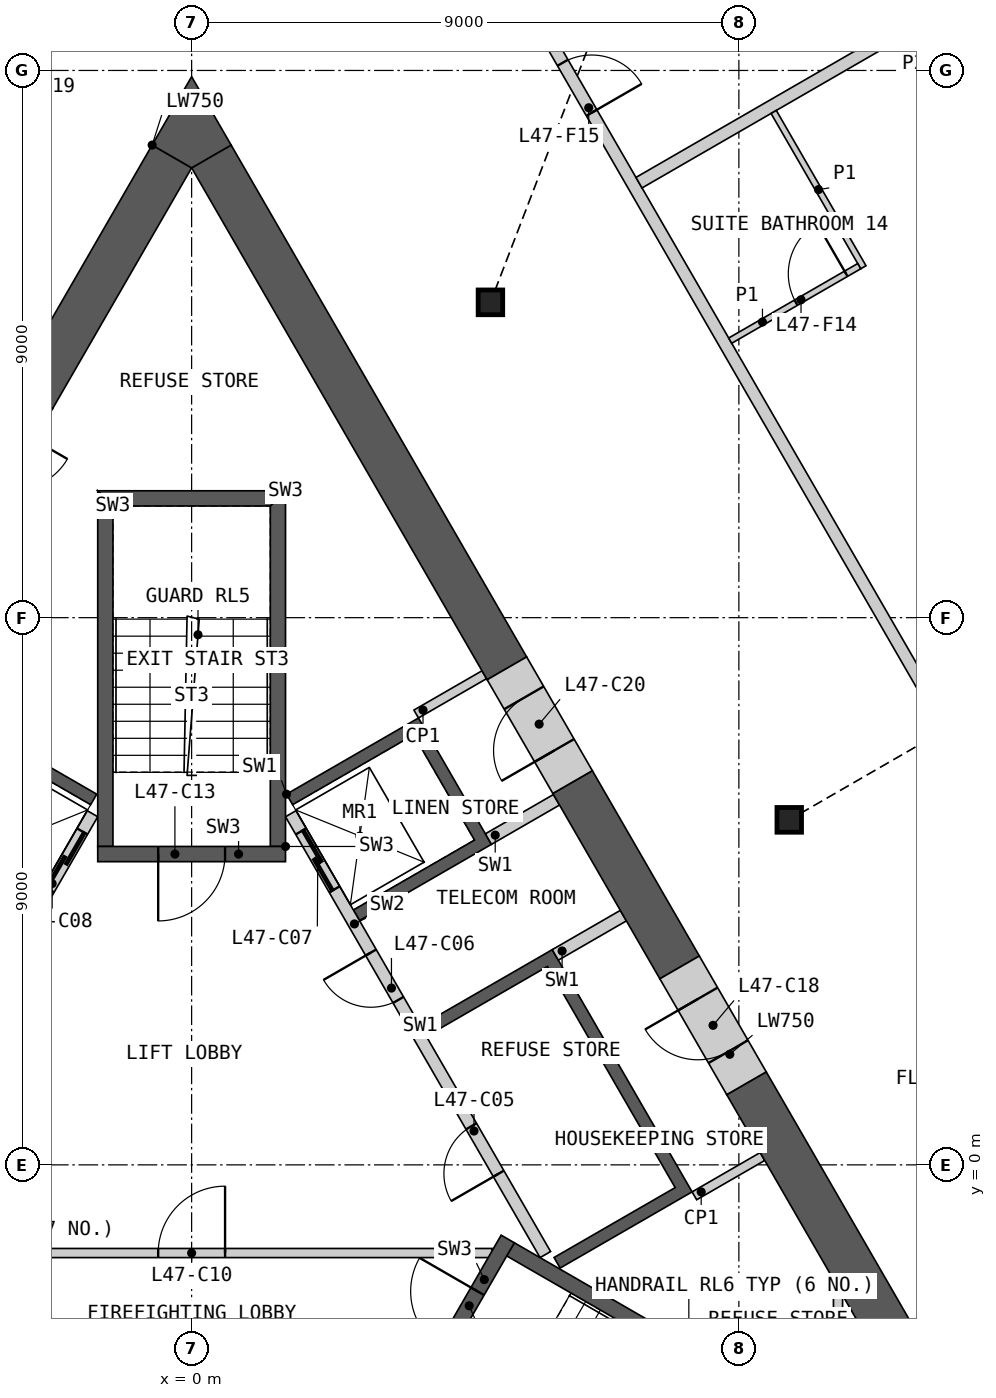
"""IFC4 building model, lengths in metres.
Left out: names, types, materials, properties, quantities, classifications, styles, units other than length and angle.
Written with IfcOpenShell. Run it as: python <this file> out.ifc"""

import sys

from ifc_helpers import new_model, si_unit, direction, frame, frame_2d, origin, origin_2d, place, context, subcontext, project, spatial, polyline, rectangle, i_section, outline, extrude, element, fill, save


model = new_model("IFC4")
c1 = context("Model", 3, precision=1e-05, world=origin(), true_north=direction((0.0, 1.0)))
c2 = subcontext(c1, "Body", "Model", "MODEL_VIEW")
j1 = project(units=[si_unit("LENGTHUNIT", "METRE"), si_unit("PLANEANGLEUNIT", "RADIAN")], contexts=[c1])
p1 = place(None, origin())
s1 = spatial("IfcSite", under=j1, at=p1, CompositionType="ELEMENT")
p2 = place(p1, origin())
s2 = spatial("IfcBuilding", under=s1, at=p2, CompositionType="ELEMENT")
p3 = place(p2, frame((0.0, 0.0, 212.4)))
s3 = spatial("IfcBuildingStorey", under=s2, at=p3, CompositionType="ELEMENT", Elevation=212.4)
for number, where, z_axis, x_axis in (
    (1, (9.828, 5.675, 0.0), (0.0, 0.0, 1.0), (1.0, 0.0, 0.0)),
    (2, (4.914, 14.186, 0.0), (0.0, 0.0, 1.0), (1.0, 0.0, 0.0)),
):
    element("IfcColumn", number, at=place(p3, frame(where, z_axis=z_axis, x_axis=x_axis)), inside=s3, PredefinedType="COLUMN", context=c2, shape_type="SweptSolid", body=[
        extrude(i_section(OverallWidth=0.404, OverallDepth=0.407, WebThickness=0.027, FlangeThickness=0.044, at=origin_2d()), origin(), (0.0, 0.0, 1.0), 3.6),
    ])
p4 = place(p3, origin())
e3 = element("IfcWall", 3, at=p4, inside=s3, PredefinedType="SHEAR", context=c2, shape_type="SweptSolid", body=[
    extrude(outline(polyline([(1.561, 6.097), (3.731, 7.35), (4.931, 5.272), (2.76, 4.019), (2.66, 4.192), (4.652, 5.342), (3.652, 7.074), (1.66, 5.924), (1.561, 6.097)])), origin(), (0.0, 0.0, 1.0), 3.25),
])
p5 = place(p3, origin())
e4 = element("IfcWall", 4, at=p5, inside=s3, PredefinedType="SHEAR", context=c2, shape_type="SweptSolid", body=[
    extrude(outline(polyline([(3.76, 2.287), (5.931, 3.54), (8.231, -0.444), (6.061, -1.697), (5.96, -1.524), (7.952, -0.374), (5.852, 3.263), (3.861, 2.113), (3.76, 2.287)])), origin(), (0.0, 0.0, 1.0), 3.25),
])
p6 = place(p3, frame((5.817, -1.476, 0.0), z_axis=(0.0, 0.0, 1.0), x_axis=(-0.500002616675, 0.866023893041, 0.0)))
e5 = element("IfcWall", 5, at=p6, inside=s3, PredefinedType="SOLIDWALL", context=c2, shape_type="SweptSolid", body=[
    extrude(rectangle(XDim=8.373, YDim=0.2, at=frame_2d((4.187, 0.0))), origin(), (0.0, 0.0, 1.0), 3.25),
])
p7 = place(p6, frame((1.537, 0.0, 0.0)))
e6 = element("IfcOpeningElement", 6, at=p7, cuts=e5, PredefinedType="OPENING", context=c2, shape_type="SweptSolid", body=[
    extrude(rectangle(XDim=0.9, YDim=2.1, at=frame_2d((0.45, 1.05))), frame((0.0, 0.11, 0.0), z_axis=(0.0, -1.0, 0.0), x_axis=(1.0, 0.0, 0.0)), (0.0, 0.0, 1.0), 0.22),
])
p8 = place(p6, frame((4.837, 0.0, 0.0)))
e7 = element("IfcOpeningElement", 7, at=p8, cuts=e5, PredefinedType="OPENING", context=c2, shape_type="SweptSolid", body=[
    extrude(rectangle(XDim=0.9, YDim=2.1, at=frame_2d((0.45, 1.05))), frame((0.0, 0.11, 0.0), z_axis=(0.0, -1.0, 0.0), x_axis=(1.0, 0.0, 0.0)), (0.0, 0.0, 1.0), 0.22),
])
p9 = place(p6, frame((6.937, 0.0, 0.0)))
e8 = element("IfcOpeningElement", 8, at=p9, cuts=e5, PredefinedType="OPENING", context=c2, shape_type="SweptSolid", body=[
    extrude(rectangle(XDim=1.1, YDim=2.1, at=frame_2d((0.55, 1.05))), frame((0.0, 0.11, 0.0), z_axis=(0.0, -1.0, 0.0), x_axis=(1.0, 0.0, 0.0)), (0.0, 0.0, 1.0), 0.22),
])
p10 = place(p3, frame((5.981, 3.453, 0.0), z_axis=(0.0, 0.0, 1.0), x_axis=(0.865968639725, 0.500098305348, 0.0)))
e9 = element("IfcWall", 9, at=p10, inside=s3, PredefinedType="SHEAR", context=c2, shape_type="SweptSolid", body=[
    extrude(rectangle(XDim=1.293, YDim=0.2, at=frame_2d((0.646, 0.0))), origin(), (0.0, 0.0, 1.0), 3.25),
])
p11 = place(p3, frame((4.881, 5.358, 0.0), z_axis=(0.0, 0.0, 1.0), x_axis=(0.866084958089, 0.499896834728, 0.0)))
e10 = element("IfcWall", 10, at=p11, inside=s3, PredefinedType="SHEAR", context=c2, shape_type="SweptSolid", body=[
    extrude(rectangle(XDim=1.293, YDim=0.2, at=frame_2d((0.646, 0.0))), origin(), (0.0, 0.0, 1.0), 3.25),
])
p12 = place(p3, origin())
e11 = element("IfcWall", 11, at=p12, inside=s3, PredefinedType="SHEAR", context=c2, shape_type="SweptSolid", body=[
    extrude(outline(polyline([(-4.96, 0.208), (-7.131, 1.461), (-3.731, 7.35), (-1.561, 6.097), (-1.66, 5.924), (-3.652, 7.074), (-4.652, 5.342), (-2.66, 4.192), (-2.76, 4.019), (-4.752, 5.169), (-5.752, 3.437), (-3.76, 2.287), (-3.861, 2.113), (-5.852, 3.263), (-6.852, 1.531), (-4.861, 0.381), (-4.96, 0.208)])), origin(), (0.0, 0.0, 1.0), 3.25),
])
p13 = place(p3, frame((-1.631, 5.776, 0.0), z_axis=(0.0, 0.0, 1.0), x_axis=(-0.499992876559, -0.866029516466, 0.0)))
e12 = element("IfcWall", 12, at=p13, inside=s3, PredefinedType="SOLIDWALL", context=c2, shape_type="SweptSolid", body=[
    extrude(rectangle(XDim=6.486, YDim=0.2, at=frame_2d((3.243, 0.0))), origin(), (0.0, 0.0, 1.0), 3.25),
])
p14 = place(p13, frame((0.337, 0.0, 0.0)))
e13 = element("IfcOpeningElement", 13, at=p14, cuts=e12, PredefinedType="OPENING", context=c2, shape_type="SweptSolid", body=[
    extrude(rectangle(XDim=1.1, YDim=2.1, at=frame_2d((0.55, 1.05))), frame((0.0, 0.11, 0.0), z_axis=(0.0, -1.0, 0.0), x_axis=(1.0, 0.0, 0.0)), (0.0, 0.0, 1.0), 0.22),
])
p15 = place(p13, frame((2.537, 0.0, 0.0)))
e14 = element("IfcOpeningElement", 14, at=p15, cuts=e12, PredefinedType="OPENING", context=c2, shape_type="SweptSolid", body=[
    extrude(rectangle(XDim=1.1, YDim=2.1, at=frame_2d((0.55, 1.05))), frame((0.0, 0.11, 0.0), z_axis=(0.0, -1.0, 0.0), x_axis=(1.0, 0.0, 0.0)), (0.0, 0.0, 1.0), 0.22),
])
p16 = place(p3, frame((-4.941, -1.45, 0.0), z_axis=(0.0, 0.0, 1.0), x_axis=(1.0, 0.0, 0.0)))
e15 = element("IfcWall", 15, at=p16, inside=s3, PredefinedType="PARTITIONING", context=c2, shape_type="SweptSolid", body=[
    extrude(rectangle(XDim=9.882, YDim=0.15, at=frame_2d((4.941, 0.0))), origin(), (0.0, 0.0, 1.0), 3.25),
])
p17 = place(p16, frame((4.391, 0.0, 0.0)))
e16 = element("IfcOpeningElement", 16, at=p17, cuts=e15, PredefinedType="OPENING", context=c2, shape_type="SweptSolid", body=[
    extrude(rectangle(XDim=1.1, YDim=2.1, at=frame_2d((0.55, 1.05))), frame((0.0, 0.085, 0.0), z_axis=(0.0, -1.0, 0.0), x_axis=(1.0, 0.0, 0.0)), (0.0, 0.0, 1.0), 0.17),
])
p18 = place(p3, origin())
e17 = element("IfcWall", 17, at=p18, inside=s3, PredefinedType="SHEAR", context=c2, shape_type="SweptSolid", body=[
    extrude(outline(polyline([(10.032, -4.298), (10.374, -4.206), (5.307, -1.281), (5.182, -1.498), (10.032, -4.298)])), origin(), (0.0, 0.0, 1.0), 3.25),
])
p19 = place(p3, frame((3.655, -3.893, 0.0), z_axis=(0.0, 0.0, 1.0), x_axis=(0.499982516597, 0.866035497597, 0.0)))
e18 = element("IfcWall", 18, at=p19, inside=s3, PredefinedType="SHEAR", context=c2, shape_type="SweptSolid", body=[
    extrude(rectangle(XDim=3.088, YDim=0.25, at=frame_2d((1.544, 0.0))), origin(), (0.0, 0.0, 1.0), 3.25),
])
p20 = place(p19, frame((0.994, 0.0, 0.0)))
e19 = element("IfcOpeningElement", 19, at=p20, cuts=e18, PredefinedType="OPENING", context=c2, shape_type="SweptSolid", body=[
    extrude(rectangle(XDim=1.1, YDim=2.1, at=frame_2d((0.55, 1.05))), frame((0.0, 0.135, 0.0), z_axis=(0.0, -1.0, 0.0), x_axis=(1.0, 0.0, 0.0)), (0.0, 0.0, 1.0), 0.27),
])
p21 = place(p3, origin())
e20 = element("IfcWall", 20, at=p21, inside=s3, PredefinedType="SHEAR", context=c2, shape_type="SweptSolid", body=[
    extrude(outline(polyline([(1.544, 5.237), (1.544, 11.087), (1.294, 10.837), (1.294, 5.237), (1.544, 5.237)])), origin(), (0.0, 0.0, 1.0), 3.25),
])
p22 = place(p3, origin())
e21 = element("IfcWall", 21, at=p22, inside=s3, PredefinedType="SHEAR", context=c2, shape_type="SweptSolid", body=[
    extrude(outline(polyline([(1.544, 11.087), (-1.544, 11.087), (-1.294, 10.837), (1.294, 10.837), (1.544, 11.087)])), origin(), (0.0, 0.0, 1.0), 3.25),
])
p23 = place(p3, origin())
e22 = element("IfcWall", 22, at=p23, inside=s3, PredefinedType="SHEAR", context=c2, shape_type="SweptSolid", body=[
    extrude(outline(polyline([(-1.294, 10.837), (-1.544, 11.087), (-1.544, 5.237), (-1.294, 5.237), (-1.294, 10.837)])), origin(), (0.0, 0.0, 1.0), 3.25),
])
p24 = place(p3, frame((1.544, 5.112, 0.0), z_axis=(0.0, 0.0, 1.0), x_axis=(-1.0, 0.0, 0.0)))
e23 = element("IfcWall", 23, at=p24, inside=s3, PredefinedType="SHEAR", context=c2, shape_type="SweptSolid", body=[
    extrude(rectangle(XDim=3.088, YDim=0.25, at=frame_2d((1.544, 0.0))), origin(), (0.0, 0.0, 1.0), 3.25),
])
p25 = place(p24, frame((0.994, 0.0, 0.0)))
e24 = element("IfcOpeningElement", 24, at=p25, cuts=e23, PredefinedType="OPENING", context=c2, shape_type="SweptSolid", body=[
    extrude(rectangle(XDim=1.1, YDim=2.1, at=frame_2d((0.55, 1.05))), frame((0.0, 0.135, 0.0), z_axis=(0.0, -1.0, 0.0), x_axis=(1.0, 0.0, 0.0)), (0.0, 0.0, 1.0), 0.27),
])
for number, where, z_axis, x_axis in (
    (25, (3.693, 7.415, 0.0), (0.0, 0.0, 1.0), (0.866, 0.5, 0.0)),
    (26, (8.268, -0.509, 0.0), (0.0, 0.0, 1.0), (0.866, 0.5, 0.0)),
):
    element("IfcWall", number, at=place(p3, frame(where, z_axis=z_axis, x_axis=x_axis)), inside=s3, PredefinedType="PARTITIONING", context=c2, shape_type="SweptSolid", body=[
        extrude(rectangle(XDim=1.293, YDim=0.15, at=frame_2d((0.646, 0.0))), origin(), (0.0, 0.0, 1.0), 3.25),
    ])
p26 = place(p3, frame((10.631, -8.199, 0.0), z_axis=(0.0, 0.0, 1.0), x_axis=(0.0, 1.0, 0.0)))
e27 = element("IfcWall", 27, at=p26, inside=s3, PredefinedType="PARTITIONING", context=c2, shape_type="SweptSolid", body=[
    extrude(rectangle(XDim=6.184, YDim=0.15, at=frame_2d((3.092, 0.0))), origin(), (0.0, 0.0, 1.0), 3.25),
])
p27 = place(p3, frame((5.185, 8.167, 0.0), z_axis=(0.0, 0.0, 1.0), x_axis=(-0.500004344816, 0.866022895289, 0.0)))
e28 = element("IfcWall", 28, at=p27, inside=s3, PredefinedType="SHEAR", context=c2, shape_type="SweptSolid", body=[
    extrude(rectangle(XDim=9.721, YDim=0.75, at=frame_2d((4.861, 0.0))), origin(), (0.0, 0.0, 1.0), 3.25),
])
p28 = place(p3, frame((12.228, -4.032, 0.0), z_axis=(0.0, 0.0, 1.0), x_axis=(-0.499993760127, 0.866029006347, 0.0)))
e29 = element("IfcWall", 29, at=p28, inside=s3, PredefinedType="SHEAR", context=c2, shape_type="SweptSolid", body=[
    extrude(rectangle(XDim=6.206, YDim=0.75, at=frame_2d((3.103, 0.0))), origin(), (0.0, 0.0, 1.0), 3.25),
])
p29 = place(p3, frame((8.025, 3.248, 0.0), z_axis=(0.0, 0.0, 1.0), x_axis=(-0.499958618571, 0.866049294045, 0.0)))
e30 = element("IfcWall", 30, at=p29, inside=s3, PredefinedType="SHEAR", context=c2, shape_type="SweptSolid", body=[
    extrude(rectangle(XDim=3.52, YDim=0.75, at=frame_2d((1.76, 0.0))), origin(), (0.0, 0.0, 1.0), 3.25),
])
p30 = place(p3, frame((-0.325, 16.585, 0.0), z_axis=(0.0, 0.0, 1.0), x_axis=(-0.499984617099, -0.866034284924, 0.0)))
e31 = element("IfcWall", 31, at=p30, inside=s3, PredefinedType="SHEAR", context=c2, shape_type="SweptSolid", body=[
    extrude(rectangle(XDim=4.568, YDim=0.75, at=frame_2d((2.284, 0.0))), origin(), (0.0, 0.0, 1.0), 3.25),
])
p31 = place(p3, origin())
e32 = element("IfcWall", 32, at=p31, inside=s3, PredefinedType="SHEAR", context=c2, shape_type="SweptSolid", body=[
    extrude(outline(polyline([(-0.649, 16.773), (0.0, 17.898), (0.649, 16.773), (0.0, 16.398), (-0.649, 16.773)])), origin(), (0.0, 0.0, 1.0), 3.25),
])
p32 = place(p3, frame((9.125, 1.343, 0.0), z_axis=(0.0, 0.0, 1.0), x_axis=(-0.499946605688, 0.86605622881, 0.0)))
e33 = element("IfcWall", 33, at=p32, inside=s3, PredefinedType="SHEAR", context=c2, shape_type="SweptSolid", body=[
    extrude(rectangle(XDim=2.2, YDim=0.75, at=frame_2d((1.1, 0.0))), origin(), (0.0, 0.0, 1.0), 3.25),
])
p33 = place(p32, frame((0.6, 0.0, 0.0)))
e34 = element("IfcOpeningElement", 34, at=p33, cuts=e33, PredefinedType="OPENING", context=c2, shape_type="SweptSolid", body=[
    extrude(rectangle(XDim=1.0, YDim=2.1, at=frame_2d((0.5, 1.05))), frame((0.0, 0.385, 0.0), z_axis=(0.0, -1.0, 0.0), x_axis=(1.0, 0.0, 0.0)), (0.0, 0.0, 1.0), 0.77),
])
p34 = place(p3, frame((6.265, 6.296, 0.0), z_axis=(0.0, 0.0, 1.0), x_axis=(-0.500029011134, 0.866008653551, 0.0)))
e35 = element("IfcWall", 35, at=p34, inside=s3, PredefinedType="SHEAR", context=c2, shape_type="SweptSolid", body=[
    extrude(rectangle(XDim=2.16, YDim=0.75, at=frame_2d((1.08, 0.0))), origin(), (0.0, 0.0, 1.0), 3.25),
])
p35 = place(p34, frame((0.6, 0.0, 0.0)))
e36 = element("IfcOpeningElement", 36, at=p35, cuts=e35, PredefinedType="OPENING", context=c2, shape_type="SweptSolid", body=[
    extrude(rectangle(XDim=1.0, YDim=2.1, at=frame_2d((0.5, 1.05))), frame((0.0, 0.385, 0.0), z_axis=(0.0, -1.0, 0.0), x_axis=(1.0, 0.0, 0.0)), (0.0, 0.0, 1.0), 0.77),
])
p36 = place(p3, frame((-2.609, 12.629, 0.0), z_axis=(0.0, 0.0, 1.0), x_axis=(-0.500077893725, -0.86598042715, 0.0)))
e37 = element("IfcWall", 37, at=p36, inside=s3, PredefinedType="SHEAR", context=c2, shape_type="SweptSolid", body=[
    extrude(rectangle(XDim=2.2, YDim=0.75, at=frame_2d((1.1, 0.0))), origin(), (0.0, 0.0, 1.0), 3.25),
])
p37 = place(p36, frame((0.6, 0.0, 0.0)))
e38 = element("IfcOpeningElement", 38, at=p37, cuts=e37, PredefinedType="OPENING", context=c2, shape_type="SweptSolid", body=[
    extrude(rectangle(XDim=1.0, YDim=2.1, at=frame_2d((0.5, 1.05))), frame((0.0, 0.385, 0.0), z_axis=(0.0, -1.0, 0.0), x_axis=(1.0, 0.0, 0.0)), (0.0, 0.0, 1.0), 0.77),
])
p38 = place(p3, frame((5.377, 19.385, 0.0), z_axis=(0.0, 0.0, 1.0), x_axis=(0.500000757641, -0.86602496636, 0.0)))
e39 = element("IfcWall", 39, at=p38, inside=s3, PredefinedType="PARTITIONING", context=c2, shape_type="SweptSolid", body=[
    extrude(rectangle(XDim=28.198, YDim=0.2, at=frame_2d((14.099, 0.0))), origin(), (0.0, 0.0, 1.0), 3.25),
])
p39 = place(p38, frame((25.345, 0.0, 0.0)))
e40 = element("IfcOpeningElement", 40, at=p39, cuts=e39, PredefinedType="OPENING", context=c2, shape_type="SweptSolid", body=[
    extrude(rectangle(XDim=1.8, YDim=2.1, at=frame_2d((0.9, 1.05))), frame((0.0, 0.11, 0.0), z_axis=(0.0, -1.0, 0.0), x_axis=(1.0, 0.0, 0.0)), (0.0, 0.0, 1.0), 0.22),
])
p40 = place(p38, frame((19.621, 0.0, 0.0)))
e41 = element("IfcOpeningElement", 41, at=p40, cuts=e39, PredefinedType="OPENING", context=c2, shape_type="SweptSolid", body=[
    extrude(rectangle(XDim=1.0, YDim=2.1, at=frame_2d((0.5, 1.05))), frame((0.0, 0.11, 0.0), z_axis=(0.0, -1.0, 0.0), x_axis=(1.0, 0.0, 0.0)), (0.0, 0.0, 1.0), 0.22),
])
p41 = place(p38, frame((16.409, 0.0, 0.0)))
e42 = element("IfcOpeningElement", 42, at=p41, cuts=e39, PredefinedType="OPENING", context=c2, shape_type="SweptSolid", body=[
    extrude(rectangle(XDim=1.1, YDim=2.1, at=frame_2d((0.55, 1.05))), frame((0.0, 0.11, 0.0), z_axis=(0.0, -1.0, 0.0), x_axis=(1.0, 0.0, 0.0)), (0.0, 0.0, 1.0), 0.22),
])
p42 = place(p38, frame((1.452, 0.0, 0.0)))
e43 = element("IfcOpeningElement", 43, at=p42, cuts=e39, PredefinedType="OPENING", context=c2, shape_type="SweptSolid", body=[
    extrude(rectangle(XDim=0.95, YDim=2.1, at=frame_2d((0.475, 1.05))), frame((0.0, 0.11, 0.0), z_axis=(0.0, -1.0, 0.0), x_axis=(1.0, 0.0, 0.0)), (0.0, 0.0, 1.0), 0.22),
])
p43 = place(p3, frame((-4.791, 14.4, 0.0), z_axis=(0.0, 0.0, 1.0), x_axis=(0.50000762079, 0.866021003874, 0.0)))
e44 = element("IfcWall", 44, at=p43, inside=s3, PredefinedType="PARTITIONING", context=c2, shape_type="SweptSolid", body=[
    extrude(rectangle(XDim=5.756, YDim=0.2, at=frame_2d((2.878, 0.0))), origin(), (0.0, 0.0, 1.0), 3.25),
])
p44 = place(p43, frame((4.304, 0.0, 0.0)))
e45 = element("IfcOpeningElement", 45, at=p44, cuts=e44, PredefinedType="OPENING", context=c2, shape_type="SweptSolid", body=[
    extrude(rectangle(XDim=1.1, YDim=2.1, at=frame_2d((0.55, 1.05))), frame((0.0, 0.11, 0.0), z_axis=(0.0, -1.0, 0.0), x_axis=(1.0, 0.0, 0.0)), (0.0, 0.0, 1.0), 0.22),
])
p45 = place(p3, frame((7.357, 16.154, 0.0), z_axis=(0.0, 0.0, 1.0), x_axis=(0.866029004385, 0.499993763526, 0.0)))
e46 = element("IfcWall", 46, at=p45, inside=s3, PredefinedType="PARTITIONING", context=c2, shape_type="SweptSolid", body=[
    extrude(rectangle(XDim=9.789, YDim=0.2, at=frame_2d((4.895, 0.0))), origin(), (0.0, 0.0, 1.0), 2.404),
])
p46 = place(p3, frame((9.573, 17.318, 0.0), z_axis=(0.0, 0.0, 1.0), x_axis=(0.500037662692, -0.866003658127, 0.0)))
e47 = element("IfcWall", 47, at=p46, inside=s3, PredefinedType="PARTITIONING", context=c2, shape_type="SweptSolid", body=[
    extrude(rectangle(XDim=2.95, YDim=0.1, at=frame_2d((1.475, 0.0))), origin(), (0.0, 0.0, 1.0), 2.404),
])
p47 = place(p3, frame((8.857, 13.556, 0.0), z_axis=(0.0, 0.0, 1.0), x_axis=(0.866014668023, 0.500018594424, 0.0)))
e48 = element("IfcWall", 48, at=p47, inside=s3, PredefinedType="PARTITIONING", context=c2, shape_type="SweptSolid", body=[
    extrude(rectangle(XDim=2.45, YDim=0.1, at=frame_2d((1.225, 0.0))), origin(), (0.0, 0.0, 1.0), 2.404),
])
p48 = place(p47, frame((1.25, 0.0, 0.0)))
e49 = element("IfcOpeningElement", 49, at=p48, cuts=e48, PredefinedType="OPENING", context=c2, shape_type="SweptSolid", body=[
    extrude(rectangle(XDim=0.95, YDim=2.1, at=frame_2d((0.475, 1.05))), frame((0.0, 0.06, 0.0), z_axis=(0.0, -1.0, 0.0), x_axis=(1.0, 0.0, 0.0)), (0.0, 0.0, 1.0), 0.12),
])
p49 = place(p7, origin())
e50 = element("IfcDoor", 50, at=p49, inside=s3, OperationType="SINGLE_SWING_LEFT", PredefinedType="DOOR", context=c2, shape_type="SweptSolid", body=[
    extrude(rectangle(XDim=0.9, YDim=2.1, at=frame_2d((0.45, 1.05))), frame((0.0, 0.025, 0.0), z_axis=(0.0, -1.0, 0.0), x_axis=(1.0, 0.0, 0.0)), (0.0, 0.0, 1.0), 0.05),
])
fill(e6, e50)
p50 = place(p8, origin())
e51 = element("IfcDoor", 51, at=p50, inside=s3, OperationType="SINGLE_SWING_RIGHT", PredefinedType="DOOR", context=c2, shape_type="SweptSolid", body=[
    extrude(rectangle(XDim=0.9, YDim=2.1, at=frame_2d((0.45, 1.05))), frame((0.0, 0.025, 0.0), z_axis=(0.0, -1.0, 0.0), x_axis=(1.0, 0.0, 0.0)), (0.0, 0.0, 1.0), 0.05),
])
fill(e7, e51)
p51 = place(p9, origin())
e52 = element("IfcDoor", 52, at=p51, inside=s3, OperationType="SLIDING_TO_LEFT", PredefinedType="DOOR", context=c2, shape_type="SweptSolid", body=[
    extrude(rectangle(XDim=1.1, YDim=2.1, at=frame_2d((0.55, 1.05))), frame((0.0, 0.025, 0.0), z_axis=(0.0, -1.0, 0.0), x_axis=(1.0, 0.0, 0.0)), (0.0, 0.0, 1.0), 0.05),
])
fill(e8, e52)
p52 = place(p14, origin())
e53 = element("IfcDoor", 53, at=p52, inside=s3, OperationType="SLIDING_TO_LEFT", PredefinedType="DOOR", context=c2, shape_type="SweptSolid", body=[
    extrude(rectangle(XDim=1.1, YDim=2.1, at=frame_2d((0.55, 1.05))), frame((0.0, 0.025, 0.0), z_axis=(0.0, -1.0, 0.0), x_axis=(1.0, 0.0, 0.0)), (0.0, 0.0, 1.0), 0.05),
])
fill(e13, e53)
p53 = place(p17, origin())
e54 = element("IfcDoor", 54, at=p53, inside=s3, OperationType="SINGLE_SWING_RIGHT", PredefinedType="DOOR", context=c2, shape_type="SweptSolid", body=[
    extrude(rectangle(XDim=1.1, YDim=2.1, at=frame_2d((0.55, 1.05))), frame((0.0, 0.025, 0.0), z_axis=(0.0, -1.0, 0.0), x_axis=(1.0, 0.0, 0.0)), (0.0, 0.0, 1.0), 0.05),
])
fill(e16, e54)
p54 = place(p20, origin())
e55 = element("IfcDoor", 55, at=p54, inside=s3, OperationType="SINGLE_SWING_RIGHT", PredefinedType="DOOR", context=c2, shape_type="SweptSolid", body=[
    extrude(rectangle(XDim=1.1, YDim=2.1, at=frame_2d((0.55, 1.05))), frame((0.0, 0.025, 0.0), z_axis=(0.0, -1.0, 0.0), x_axis=(1.0, 0.0, 0.0)), (0.0, 0.0, 1.0), 0.05),
])
fill(e19, e55)
p55 = place(p25, origin())
e56 = element("IfcDoor", 56, at=p55, inside=s3, OperationType="SINGLE_SWING_RIGHT", PredefinedType="DOOR", context=c2, shape_type="SweptSolid", body=[
    extrude(rectangle(XDim=1.1, YDim=2.1, at=frame_2d((0.55, 1.05))), frame((0.0, 0.025, 0.0), z_axis=(0.0, -1.0, 0.0), x_axis=(1.0, 0.0, 0.0)), (0.0, 0.0, 1.0), 0.05),
])
fill(e24, e56)
p56 = place(p33, origin())
e57 = element("IfcDoor", 57, at=p56, inside=s3, OperationType="SINGLE_SWING_RIGHT", PredefinedType="DOOR", context=c2, shape_type="SweptSolid", body=[
    extrude(rectangle(XDim=1.0, YDim=2.1, at=frame_2d((0.5, 1.05))), frame((0.0, 0.13, 0.0), z_axis=(0.0, -1.0, 0.0), x_axis=(1.0, 0.0, 0.0)), (0.0, 0.0, 1.0), 0.05),
])
fill(e34, e57)
p57 = place(p35, origin())
e58 = element("IfcDoor", 58, at=p57, inside=s3, OperationType="SINGLE_SWING_LEFT", PredefinedType="DOOR", context=c2, shape_type="SweptSolid", body=[
    extrude(rectangle(XDim=1.0, YDim=2.1, at=frame_2d((0.5, 1.05))), frame((0.0, 0.13, 0.0), z_axis=(0.0, -1.0, 0.0), x_axis=(1.0, 0.0, 0.0)), (0.0, 0.0, 1.0), 0.05),
])
fill(e36, e58)
p58 = place(p48, origin())
e59 = element("IfcDoor", 59, at=p58, inside=s3, OperationType="SINGLE_SWING_RIGHT", PredefinedType="DOOR", context=c2, shape_type="SweptSolid", body=[
    extrude(rectangle(XDim=0.95, YDim=2.1, at=frame_2d((0.475, 1.05))), frame((0.0, 0.025, 0.0), z_axis=(0.0, -1.0, 0.0), x_axis=(1.0, 0.0, 0.0)), (0.0, 0.0, 1.0), 0.05),
])
fill(e49, e59)
p59 = place(p42, origin())
e60 = element("IfcDoor", 60, at=p59, inside=s3, OperationType="SINGLE_SWING_RIGHT", PredefinedType="DOOR", context=c2, shape_type="SweptSolid", body=[
    extrude(rectangle(XDim=0.95, YDim=2.1, at=frame_2d((0.475, 1.05))), frame((0.0, 0.025, 0.0), z_axis=(0.0, -1.0, 0.0), x_axis=(1.0, 0.0, 0.0)), (0.0, 0.0, 1.0), 0.05),
])
fill(e43, e60)
p60 = place(p44, origin())
e61 = element("IfcDoor", 61, at=p60, inside=s3, OperationType="SINGLE_SWING_RIGHT", PredefinedType="DOOR", context=c2, shape_type="SweptSolid", body=[
    extrude(rectangle(XDim=1.1, YDim=2.1, at=frame_2d((0.55, 1.05))), frame((0.0, 0.025, 0.0), z_axis=(0.0, -1.0, 0.0), x_axis=(1.0, 0.0, 0.0)), (0.0, 0.0, 1.0), 0.05),
])
fill(e45, e61)
save(model, sys.argv[1])
